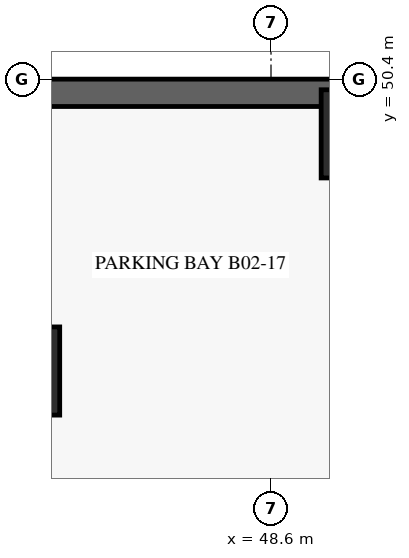
"""IFC4 building model, lengths in metres.
Left out: names, types, materials, properties, quantities, classifications, styles, units other than length and angle.
Written with IfcOpenShell. Run it as: python <this file> out.ifc"""

import sys

from ifc_helpers import new_model, si_unit, direction, frame, frame_2d, origin, origin_2d, place, context, subcontext, project, spatial, rectangle, extrude, source, transform, mapped, element, save


model = new_model("IFC4")
c1 = context("Model", 3, precision=1e-05, world=origin(), true_north=direction((0.0, 1.0)))
c2 = subcontext(c1, "Body", "Model", "MODEL_VIEW")
j1 = project(units=[si_unit("LENGTHUNIT", "METRE"), si_unit("PLANEANGLEUNIT", "RADIAN")], contexts=[c1])
p1 = place(None, origin())
s1 = spatial("IfcSite", under=j1, at=p1, CompositionType="ELEMENT")
p2 = place(p1, origin())
s2 = spatial("IfcBuilding", under=s1, at=p2, CompositionType="ELEMENT")
p3 = place(p2, frame((0.0, 0.0, -7.2)))
s3 = spatial("IfcBuildingStorey", under=s2, at=p3, CompositionType="ELEMENT", Elevation=-7.2)
p4 = place(p3, frame((64.575, 50.175, -0.36), z_axis=(0.0, 0.0, 1.0), x_axis=(-1.0, 0.0, 0.0)))
e1 = element("IfcWall", 1, at=p4, inside=s3, PredefinedType="USERDEFINED", context=c2, shape_type="SweptSolid", body=[
    extrude(rectangle(XDim=64.35, YDim=0.45, at=frame_2d((32.175, 0.0))), origin(), (0.0, 0.0, 1.0), 3.598),
])
m1 = source(origin(), c2, "Body", "SweptSolid", [
    extrude(rectangle(XDim=1.45, YDim=1.45, at=origin_2d()), origin(), (0.0, 0.0, 1.0), 3.6),
])
for number, where, z_axis, x_axis in (
    (2, (44.4, 45.6, -0.36), (0.0, 0.0, 1.0), (1.0, 0.0, 0.0)),
    (3, (50.15, 49.5, -0.36), (0.0, 0.0, 1.0), (1.0, 0.0, 0.0)),
):
    element("IfcColumn", number, at=place(p3, frame(where, z_axis=z_axis, x_axis=x_axis)), inside=s3, PredefinedType="COLUMN", context=c2, shape_type="MappedRepresentation", body=[
        mapped(m1, transform((0.0, 0.0, 0.0), scale=1.0)),
    ])
save(model, sys.argv[1])
